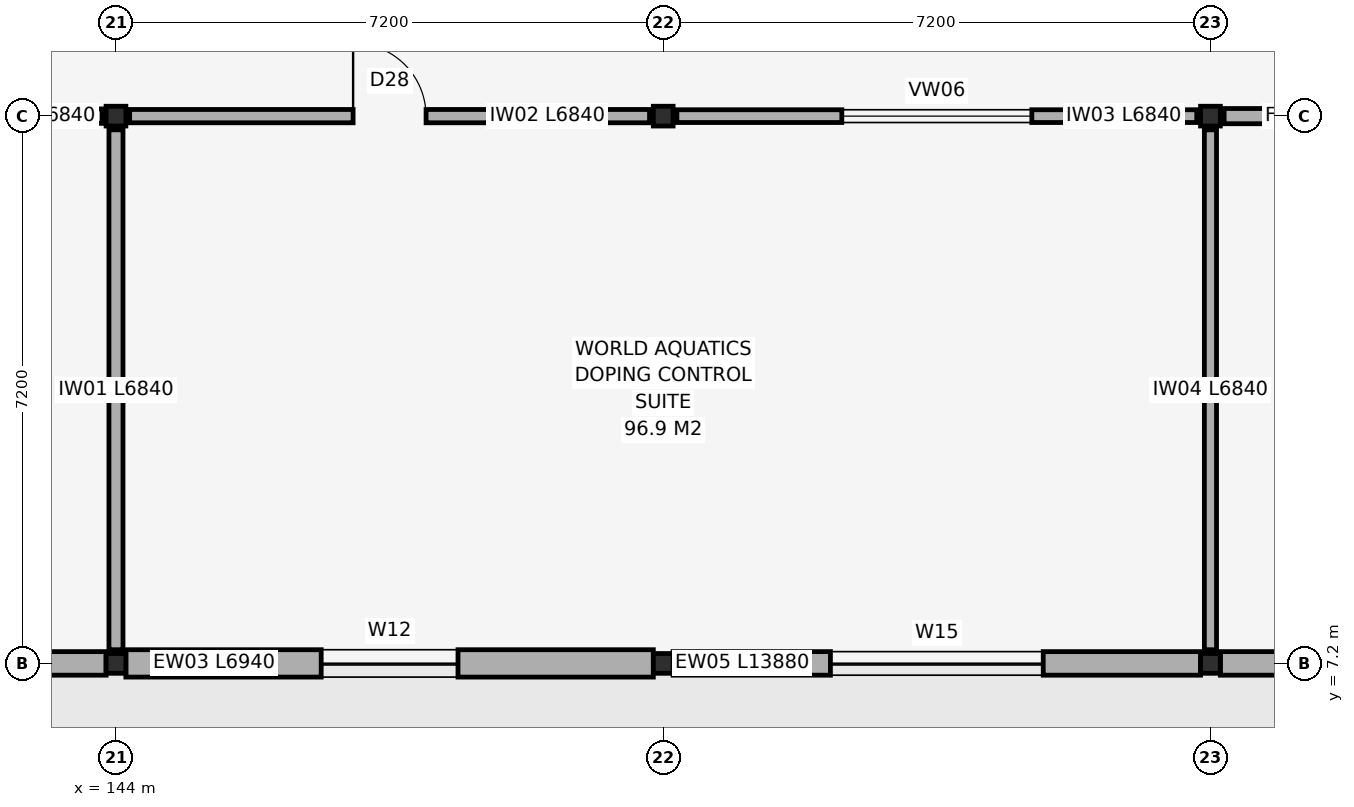
"""IFC4 building model, lengths in metres.
Left out: names, types, materials, properties, quantities, classifications, styles, units other than length and angle.
Written with IfcOpenShell. Run it as: python <this file> out.ifc"""

import sys

from ifc_helpers import new_model, si_unit, direction, frame, frame_2d, origin, origin_2d, place, context, subcontext, project, spatial, rectangle, hollow_rectangle, extrude, element, fill, save


model = new_model("IFC4")
c1 = context("Model", 3, precision=1e-05, world=origin(), true_north=direction((0.0, 1.0)))
c2 = subcontext(c1, "Body", "Model", "MODEL_VIEW")
j1 = project(units=[si_unit("LENGTHUNIT", "METRE"), si_unit("PLANEANGLEUNIT", "RADIAN")], contexts=[c1])
p1 = place(None, origin())
s1 = spatial("IfcSite", under=j1, at=p1, CompositionType="ELEMENT")
p2 = place(p1, origin())
s2 = spatial("IfcBuilding", under=s1, at=p2, CompositionType="ELEMENT")
p3 = place(p2, frame((0.0, 0.0, 23.4)))
s3 = spatial("IfcBuildingStorey", under=s2, at=p3, CompositionType="ELEMENT", Elevation=23.4)
for number, where, z_axis, x_axis in (
    (1, (144.0, 7.2, 0.0), (0.0, 0.0, 1.0), (1.0, 0.0, 0.0)),
    (2, (144.0, 14.4, 0.0), (0.0, 0.0, 1.0), (1.0, 0.0, 0.0)),
    (3, (151.2, 7.2, 0.0), (0.0, 0.0, 1.0), (1.0, 0.0, 0.0)),
    (4, (151.2, 14.4, 0.0), (0.0, 0.0, 1.0), (1.0, 0.0, 0.0)),
    (5, (158.4, 7.2, 0.0), (0.0, 0.0, 1.0), (1.0, 0.0, 0.0)),
    (6, (158.4, 14.4, 0.0), (0.0, 0.0, 1.0), (1.0, 0.0, 0.0)),
):
    element("IfcColumn", number, at=place(p3, frame(where, z_axis=z_axis, x_axis=x_axis)), inside=s3, PredefinedType="COLUMN", context=c2, shape_type="SweptSolid", body=[
        extrude(hollow_rectangle(XDim=0.26, YDim=0.26, WallThickness=0.012, at=origin_2d()), origin(), (0.0, 0.0, 1.0), 4.2),
    ])
p4 = place(p3, frame((136.93, 7.2, 0.0), z_axis=(0.0, 0.0, 1.0), x_axis=(1.0, 0.0, 0.0)))
e7 = element("IfcWall", 7, at=p4, inside=s3, PredefinedType="SOLIDWALL", context=c2, shape_type="SweptSolid", body=[
    extrude(rectangle(XDim=6.94, YDim=0.31, at=frame_2d((3.47, 0.0))), origin(), (0.0, 0.0, 1.0), 3.98),
])
p5 = place(p4, frame((2.92, 0.0, 0.0)))
e8 = element("IfcOpeningElement", 8, at=p5, cuts=e7, PredefinedType="OPENING", context=c2, shape_type="SweptSolid", body=[
    extrude(rectangle(XDim=1.1, YDim=2.2, at=frame_2d((0.55, 1.1))), frame((0.0, 0.17, 0.0), z_axis=(0.0, -1.0, 0.0), x_axis=(1.0, 0.0, 0.0)), (0.0, 0.0, 1.0), 0.34),
])
p6 = place(p3, frame((144.13, 7.2, 0.0), z_axis=(0.0, 0.0, 1.0), x_axis=(1.0, 0.0, 0.0)))
e9 = element("IfcWall", 9, at=p6, inside=s3, PredefinedType="SOLIDWALL", context=c2, shape_type="SweptSolid", body=[
    extrude(rectangle(XDim=6.94, YDim=0.36, at=frame_2d((3.47, 0.0))), origin(), (0.0, 0.0, 1.0), 3.98),
])
p7 = place(p6, frame((2.57, 0.0, 0.95)))
e10 = element("IfcOpeningElement", 10, at=p7, cuts=e9, PredefinedType="OPENING", context=c2, shape_type="SweptSolid", body=[
    extrude(rectangle(XDim=1.8, YDim=1.75, at=frame_2d((0.9, 0.875))), frame((0.0, 0.195, 0.0), z_axis=(0.0, -1.0, 0.0), x_axis=(1.0, 0.0, 0.0)), (0.0, 0.0, 1.0), 0.39),
])
p8 = place(p3, frame((151.33, 7.2, 0.0), z_axis=(0.0, 0.0, 1.0), x_axis=(1.0, 0.0, 0.0)))
e11 = element("IfcWall", 11, at=p8, inside=s3, PredefinedType="SOLIDWALL", context=c2, shape_type="SweptSolid", body=[
    extrude(rectangle(XDim=6.94, YDim=0.31, at=frame_2d((3.47, 0.0))), origin(), (0.0, 0.0, 1.0), 3.98),
])
p9 = place(p8, frame((2.07, 0.0, 0.95)))
e12 = element("IfcOpeningElement", 12, at=p9, cuts=e11, PredefinedType="OPENING", context=c2, shape_type="SweptSolid", body=[
    extrude(rectangle(XDim=2.8, YDim=1.5, at=frame_2d((1.4, 0.75))), frame((0.0, 0.17, 0.0), z_axis=(0.0, -1.0, 0.0), x_axis=(1.0, 0.0, 0.0)), (0.0, 0.0, 1.0), 0.34),
])
p10 = place(p3, frame((158.53, 7.2, 0.0), z_axis=(0.0, 0.0, 1.0), x_axis=(1.0, 0.0, 0.0)))
e13 = element("IfcWall", 13, at=p10, inside=s3, PredefinedType="SOLIDWALL", context=c2, shape_type="SweptSolid", body=[
    extrude(rectangle(XDim=6.94, YDim=0.31, at=frame_2d((3.47, 0.0))), origin(), (0.0, 0.0, 1.0), 3.98),
])
p11 = place(p10, frame((2.42, 0.0, 0.95)))
e14 = element("IfcOpeningElement", 14, at=p11, cuts=e13, PredefinedType="OPENING", context=c2, shape_type="SweptSolid", body=[
    extrude(rectangle(XDim=2.1, YDim=2.65, at=frame_2d((1.05, 1.325))), frame((0.0, 0.17, 0.0), z_axis=(0.0, -1.0, 0.0), x_axis=(1.0, 0.0, 0.0)), (0.0, 0.0, 1.0), 0.34),
])
p12 = place(p3, frame((136.98, 14.4, 0.0), z_axis=(0.0, 0.0, 1.0), x_axis=(1.0, 0.0, 0.0)))
e15 = element("IfcWall", 15, at=p12, inside=s3, PredefinedType="SOLIDWALL", context=c2, shape_type="SweptSolid", body=[
    extrude(rectangle(XDim=6.84, YDim=0.19, at=frame_2d((3.42, 0.0))), origin(), (0.0, 0.0, 1.0), 3.98),
])
p13 = place(p12, frame((2.02, 0.0, 0.95)))
e16 = element("IfcOpeningElement", 16, at=p13, cuts=e15, PredefinedType="OPENING", context=c2, shape_type="SweptSolid", body=[
    extrude(rectangle(XDim=2.8, YDim=1.35, at=frame_2d((1.4, 0.675))), frame((0.0, 0.11, 0.0), z_axis=(0.0, -1.0, 0.0), x_axis=(1.0, 0.0, 0.0)), (0.0, 0.0, 1.0), 0.22),
])
p14 = place(p3, frame((144.0, 7.38, 0.0), z_axis=(0.0, 0.0, 1.0), x_axis=(0.0, 1.0, 0.0)))
e17 = element("IfcWall", 17, at=p14, inside=s3, PredefinedType="PARTITIONING", context=c2, shape_type="SweptSolid", body=[
    extrude(rectangle(XDim=6.84, YDim=0.185, at=frame_2d((3.42, 0.0))), origin(), (0.0, 0.0, 1.0), 3.98),
])
p15 = place(p3, frame((144.18, 14.4, 0.0), z_axis=(0.0, 0.0, 1.0), x_axis=(1.0, 0.0, 0.0)))
e18 = element("IfcWall", 18, at=p15, inside=s3, PredefinedType="PARTITIONING", context=c2, shape_type="SweptSolid", body=[
    extrude(rectangle(XDim=6.84, YDim=0.175, at=frame_2d((3.42, 0.0))), origin(), (0.0, 0.0, 1.0), 3.98),
])
p16 = place(p15, frame((2.94, 0.0, 0.0)))
e19 = element("IfcOpeningElement", 19, at=p16, cuts=e18, PredefinedType="OPENING", context=c2, shape_type="SweptSolid", body=[
    extrude(rectangle(XDim=0.96, YDim=2.15, at=frame_2d((0.48, 1.075))), frame((0.0, 0.103, 0.0), z_axis=(0.0, -1.0, 0.0), x_axis=(1.0, 0.0, 0.0)), (0.0, 0.0, 1.0), 0.205),
])
p17 = place(p3, frame((151.38, 14.4, 0.0), z_axis=(0.0, 0.0, 1.0), x_axis=(1.0, 0.0, 0.0)))
e20 = element("IfcWall", 20, at=p17, inside=s3, PredefinedType="PARTITIONING", context=c2, shape_type="SweptSolid", body=[
    extrude(rectangle(XDim=6.84, YDim=0.168, at=frame_2d((3.42, 0.0))), origin(), (0.0, 0.0, 1.0), 3.98),
])
p18 = place(p17, frame((2.17, 0.0, 0.95)))
e21 = element("IfcOpeningElement", 21, at=p18, cuts=e20, PredefinedType="OPENING", context=c2, shape_type="SweptSolid", body=[
    extrude(rectangle(XDim=2.5, YDim=1.35, at=frame_2d((1.25, 0.675))), frame((0.0, 0.099, 0.0), z_axis=(0.0, -1.0, 0.0), x_axis=(1.0, 0.0, 0.0)), (0.0, 0.0, 1.0), 0.198),
])
p19 = place(p3, frame((158.4, 7.38, 0.0), z_axis=(0.0, 0.0, 1.0), x_axis=(0.0, 1.0, 0.0)))
e22 = element("IfcWall", 22, at=p19, inside=s3, PredefinedType="PARTITIONING", context=c2, shape_type="SweptSolid", body=[
    extrude(rectangle(XDim=6.84, YDim=0.16, at=frame_2d((3.42, 0.0))), origin(), (0.0, 0.0, 1.0), 3.98),
])
p20 = place(p3, frame((158.58, 14.4, 0.0), z_axis=(0.0, 0.0, 1.0), x_axis=(1.0, 0.0, 0.0)))
e23 = element("IfcWall", 23, at=p20, inside=s3, PredefinedType="SOLIDWALL", context=c2, shape_type="SweptSolid", body=[
    extrude(rectangle(XDim=6.84, YDim=0.2, at=frame_2d((3.42, 0.0))), origin(), (0.0, 0.0, 1.0), 3.98),
])
p21 = place(p20, frame((2.92, 0.0, 0.0)))
e24 = element("IfcOpeningElement", 24, at=p21, cuts=e23, PredefinedType="OPENING", context=c2, shape_type="SweptSolid", body=[
    extrude(rectangle(XDim=1.0, YDim=2.1, at=frame_2d((0.5, 1.05))), frame((0.0, 0.115, 0.0), z_axis=(0.0, -1.0, 0.0), x_axis=(1.0, 0.0, 0.0)), (0.0, 0.0, 1.0), 0.23),
])
p22 = place(p7, origin())
e25 = element("IfcWindow", 25, at=p22, inside=s3, PartitioningType="SINGLE_PANEL", PredefinedType="WINDOW", context=c2, shape_type="SweptSolid", body=[
    extrude(rectangle(XDim=1.8, YDim=1.75, at=frame_2d((0.9, 0.875))), frame((0.0, 0.03, 0.0), z_axis=(0.0, -1.0, 0.0), x_axis=(1.0, 0.0, 0.0)), (0.0, 0.0, 1.0), 0.06),
])
fill(e10, e25)
p23 = place(p9, origin())
e26 = element("IfcWindow", 26, at=p23, inside=s3, PartitioningType="SINGLE_PANEL", PredefinedType="WINDOW", context=c2, shape_type="SweptSolid", body=[
    extrude(rectangle(XDim=2.8, YDim=1.5, at=frame_2d((1.4, 0.75))), frame((0.0, 0.03, 0.0), z_axis=(0.0, -1.0, 0.0), x_axis=(1.0, 0.0, 0.0)), (0.0, 0.0, 1.0), 0.06),
])
fill(e12, e26)
p24 = place(p16, frame((0.96, 0.0, 0.0), z_axis=(0.0, 0.0, 1.0), x_axis=(-1.0, 0.0, 0.0)))
e27 = element("IfcDoor", 27, at=p24, inside=s3, OperationType="SINGLE_SWING_RIGHT", PredefinedType="DOOR", context=c2, shape_type="SweptSolid", body=[
    extrude(rectangle(XDim=0.96, YDim=2.15, at=frame_2d((0.48, 1.075))), frame((0.0, 0.025, 0.0), z_axis=(0.0, -1.0, 0.0), x_axis=(1.0, 0.0, 0.0)), (0.0, 0.0, 1.0), 0.05),
])
fill(e19, e27)
p25 = place(p18, origin())
e28 = element("IfcWindow", 28, at=p25, inside=s3, PartitioningType="SINGLE_PANEL", PredefinedType="WINDOW", context=c2, shape_type="SweptSolid", body=[
    extrude(rectangle(XDim=2.5, YDim=1.35, at=frame_2d((1.25, 0.675))), frame((0.0, 0.03, 0.0), z_axis=(0.0, -1.0, 0.0), x_axis=(1.0, 0.0, 0.0)), (0.0, 0.0, 1.0), 0.06),
])
fill(e21, e28)
save(model, sys.argv[1])
